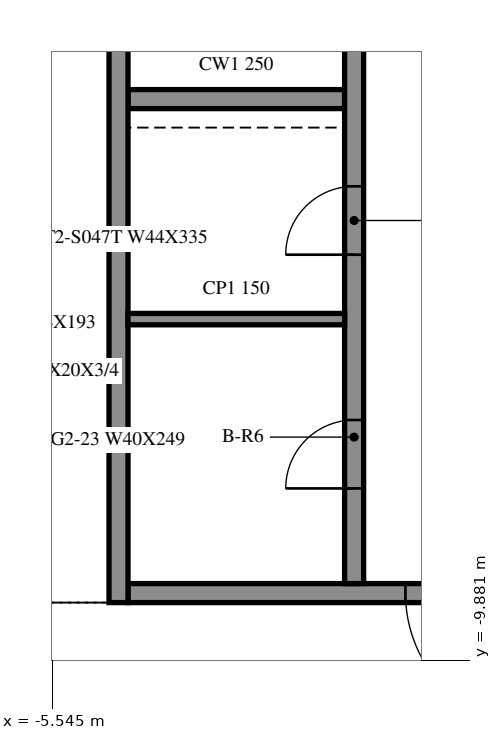
"""IFC4 building model, lengths in metres.
Left out: names, types, materials, properties, quantities, classifications, styles, units other than length and angle.
Written with IfcOpenShell. Run it as: python <this file> out.ifc"""

import sys

from ifc_helpers import new_model, si_unit, direction, frame, frame_2d, origin, place, context, subcontext, project, spatial, rectangle, extrude, element, fill, save


model = new_model("IFC4")
c1 = context("Model", 3, precision=1e-05, world=origin(), true_north=direction((0.0, 1.0)))
c2 = subcontext(c1, "Body", "Model", "MODEL_VIEW")
j1 = project(units=[si_unit("LENGTHUNIT", "METRE"), si_unit("PLANEANGLEUNIT", "RADIAN")], contexts=[c1])
p1 = place(None, origin())
s1 = spatial("IfcSite", under=j1, at=p1, CompositionType="ELEMENT")
p2 = place(p1, origin())
s2 = spatial("IfcBuilding", under=s1, at=p2, CompositionType="ELEMENT")
p3 = place(p2, frame((0.0, 0.0, 80.4)))
s3 = spatial("IfcBuildingStorey", under=s2, at=p3, CompositionType="ELEMENT", Elevation=80.4)
p4 = place(p3, frame((-4.675, 15.125, 0.0), z_axis=(0.0, 0.0, 1.0), x_axis=(0.0, -1.0, 0.0)))
e1 = element("IfcWall", 1, at=p4, inside=s3, PredefinedType="SOLIDWALL", context=c2, shape_type="SweptSolid", body=[
    extrude(rectangle(XDim=24.25, YDim=0.25, at=frame_2d((12.125, 0.0))), origin(), (0.0, 0.0, 1.0), 4.06),
])
p5 = place(p3, frame((4.55, -9.0, 0.0), z_axis=(0.0, 0.0, 1.0), x_axis=(-1.0, 0.0, 0.0)))
e2 = element("IfcWall", 2, at=p5, inside=s3, PredefinedType="SOLIDWALL", context=c2, shape_type="SweptSolid", body=[
    extrude(rectangle(XDim=9.1, YDim=0.25, at=frame_2d((4.55, 0.0))), origin(), (0.0, 0.0, 1.0), 4.06),
])
p6 = place(p5, frame((3.65, 0.0, 0.0)))
e3 = element("IfcOpeningElement", 3, at=p6, cuts=e2, PredefinedType="OPENING", context=c2, shape_type="SweptSolid", body=[
    extrude(rectangle(XDim=1.8, YDim=2.1, at=frame_2d((0.9, 1.05))), frame((0.0, 0.135, 0.0), z_axis=(0.0, -1.0, 0.0), x_axis=(1.0, 0.0, 0.0)), (0.0, 0.0, 1.0), 0.27),
])
p7 = place(p3, frame((-1.575, -8.875, 0.0), z_axis=(0.0, 0.0, 1.0), x_axis=(0.0, 1.0, 0.0)))
e4 = element("IfcWall", 4, at=p7, inside=s3, PredefinedType="SOLIDWALL", context=c2, shape_type="SweptSolid", body=[
    extrude(rectangle(XDim=23.75, YDim=0.25, at=frame_2d((11.875, 0.0))), origin(), (0.0, 0.0, 1.0), 4.06),
])
p8 = place(p7, frame((9.775, 0.0, 0.0)))
e5 = element("IfcOpeningElement", 5, at=p8, cuts=e4, PredefinedType="OPENING", context=c2, shape_type="SweptSolid", body=[
    extrude(rectangle(XDim=0.9, YDim=2.1, at=frame_2d((0.45, 1.05))), frame((0.0, 0.135, 0.0), z_axis=(0.0, -1.0, 0.0), x_axis=(1.0, 0.0, 0.0)), (0.0, 0.0, 1.0), 0.27),
])
p9 = place(p7, frame((15.225, 0.0, 0.0)))
e6 = element("IfcOpeningElement", 6, at=p9, cuts=e4, PredefinedType="OPENING", context=c2, shape_type="SweptSolid", body=[
    extrude(rectangle(XDim=0.9, YDim=2.1, at=frame_2d((0.45, 1.05))), frame((0.0, 0.135, 0.0), z_axis=(0.0, -1.0, 0.0), x_axis=(1.0, 0.0, 0.0)), (0.0, 0.0, 1.0), 0.27),
])
p10 = place(p7, frame((1.252, 0.0, 0.0)))
e7 = element("IfcOpeningElement", 7, at=p10, cuts=e4, PredefinedType="OPENING", context=c2, shape_type="SweptSolid", body=[
    extrude(rectangle(XDim=0.9, YDim=2.1, at=frame_2d((0.45, 1.05))), frame((0.0, 0.135, 0.0), z_axis=(0.0, -1.0, 0.0), x_axis=(1.0, 0.0, 0.0)), (0.0, 0.0, 1.0), 0.27),
])
p11 = place(p7, frame((4.327, 0.0, 0.0)))
e8 = element("IfcOpeningElement", 8, at=p11, cuts=e4, PredefinedType="OPENING", context=c2, shape_type="SweptSolid", body=[
    extrude(rectangle(XDim=0.9, YDim=2.1, at=frame_2d((0.45, 1.05))), frame((0.0, 0.135, 0.0), z_axis=(0.0, -1.0, 0.0), x_axis=(1.0, 0.0, 0.0)), (0.0, 0.0, 1.0), 0.27),
])
p12 = place(p7, frame((18.762, 0.0, 0.0)))
e9 = element("IfcOpeningElement", 9, at=p12, cuts=e4, PredefinedType="OPENING", context=c2, shape_type="SweptSolid", body=[
    extrude(rectangle(XDim=0.9, YDim=2.1, at=frame_2d((0.45, 1.05))), frame((0.0, 0.135, 0.0), z_axis=(0.0, -1.0, 0.0), x_axis=(1.0, 0.0, 0.0)), (0.0, 0.0, 1.0), 0.27),
])
p13 = place(p7, frame((21.837, 0.0, 0.0)))
e10 = element("IfcOpeningElement", 10, at=p13, cuts=e4, PredefinedType="OPENING", context=c2, shape_type="SweptSolid", body=[
    extrude(rectangle(XDim=0.9, YDim=2.1, at=frame_2d((0.45, 1.05))), frame((0.0, 0.135, 0.0), z_axis=(0.0, -1.0, 0.0), x_axis=(1.0, 0.0, 0.0)), (0.0, 0.0, 1.0), 0.27),
])
p14 = place(p3, frame((-4.55, -2.5, 0.0), z_axis=(0.0, 0.0, 1.0), x_axis=(1.0, 0.0, 0.0)))
e11 = element("IfcWall", 11, at=p14, inside=s3, PredefinedType="SOLIDWALL", context=c2, shape_type="SweptSolid", body=[
    extrude(rectangle(XDim=2.85, YDim=0.25, at=frame_2d((1.425, 0.0))), origin(), (0.0, 0.0, 1.0), 4.06),
])
p15 = place(p3, frame((-4.55, -5.395, 0.0), z_axis=(0.0, 0.0, 1.0), x_axis=(1.0, 0.0, 0.0)))
e12 = element("IfcWall", 12, at=p15, inside=s3, PredefinedType="PARTITIONING", context=c2, shape_type="SweptSolid", body=[
    extrude(rectangle(XDim=2.85, YDim=0.15, at=frame_2d((1.425, 0.0))), origin(), (0.0, 0.0, 1.0), 4.06),
])
p16 = place(p6, origin())
e13 = element("IfcDoor", 13, at=p16, inside=s3, OperationType="DOUBLE_DOOR_SINGLE_SWING", PredefinedType="DOOR", context=c2, shape_type="SweptSolid", body=[
    extrude(rectangle(XDim=1.8, YDim=2.1, at=frame_2d((0.9, 1.05))), frame((0.0, 0.025, 0.0), z_axis=(0.0, -1.0, 0.0), x_axis=(1.0, 0.0, 0.0)), (0.0, 0.0, 1.0), 0.05),
])
fill(e3, e13)
p17 = place(p10, origin())
e14 = element("IfcDoor", 14, at=p17, inside=s3, OperationType="SINGLE_SWING_RIGHT", PredefinedType="DOOR", context=c2, shape_type="SweptSolid", body=[
    extrude(rectangle(XDim=0.9, YDim=2.1, at=frame_2d((0.45, 1.05))), frame((0.0, 0.025, 0.0), z_axis=(0.0, -1.0, 0.0), x_axis=(1.0, 0.0, 0.0)), (0.0, 0.0, 1.0), 0.05),
])
fill(e7, e14)
p18 = place(p11, origin())
e15 = element("IfcDoor", 15, at=p18, inside=s3, OperationType="SINGLE_SWING_LEFT", PredefinedType="DOOR", context=c2, shape_type="SweptSolid", body=[
    extrude(rectangle(XDim=0.9, YDim=2.1, at=frame_2d((0.45, 1.05))), frame((0.0, 0.025, 0.0), z_axis=(0.0, -1.0, 0.0), x_axis=(1.0, 0.0, 0.0)), (0.0, 0.0, 1.0), 0.05),
])
fill(e8, e15)
save(model, sys.argv[1])
